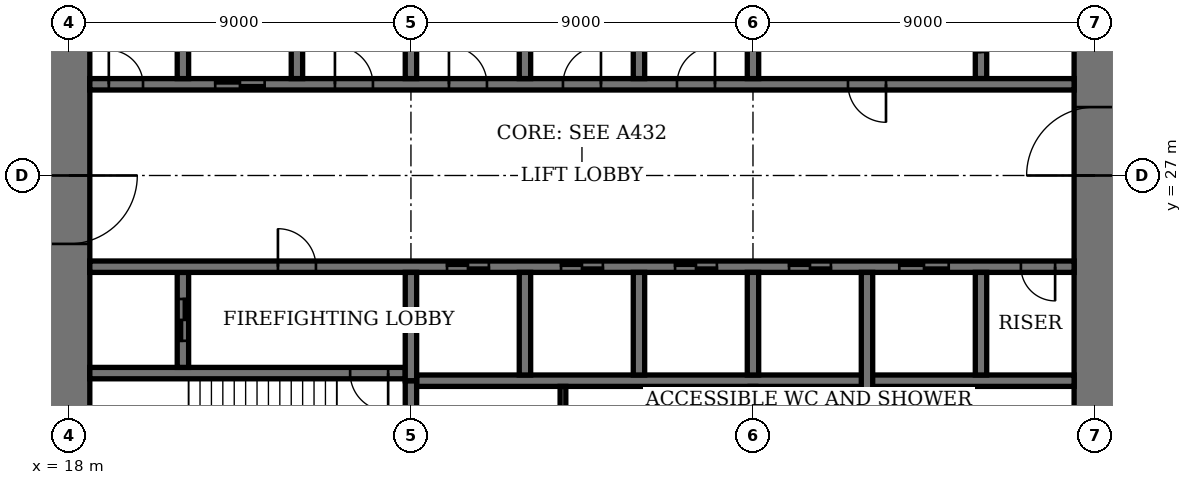
"""IFC4 building model, lengths in metres.
Left out: names, types, materials, properties, quantities, classifications, styles, units other than length and angle.
Written with IfcOpenShell. Run it as: python <this file> out.ifc"""

import sys

from ifc_helpers import new_model, si_unit, direction, frame, frame_2d, origin, place, context, subcontext, project, spatial, rectangle, extrude, element, fill, save


model = new_model("IFC4")
c1 = context("Model", 3, precision=1e-05, world=origin(), true_north=direction((0.0, 1.0)))
c2 = subcontext(c1, "Body", "Model", "MODEL_VIEW")
j1 = project(units=[si_unit("LENGTHUNIT", "METRE"), si_unit("PLANEANGLEUNIT", "RADIAN")], contexts=[c1])
p1 = place(None, origin())
s1 = spatial("IfcSite", under=j1, at=p1, CompositionType="ELEMENT")
p2 = place(p1, origin())
s2 = spatial("IfcBuilding", under=s1, at=p2, CompositionType="ELEMENT")
p3 = place(p2, frame((0.0, 0.0, 263.4)))
s3 = spatial("IfcBuildingStorey", under=s2, at=p3, CompositionType="ELEMENT", Elevation=263.4)
p4 = place(p3, frame((18.0, 35.45, 0.0), z_axis=(0.0, 0.0, 1.0), x_axis=(0.0, -1.0, 0.0)))
e1 = element("IfcWall", 1, at=p4, inside=s3, PredefinedType="SHEAR", context=c2, shape_type="SweptSolid", body=[
    extrude(rectangle(XDim=16.9, YDim=1.1, at=frame_2d((8.45, 0.0))), origin(), (0.0, 0.0, 1.0), 4.0),
])
p5 = place(p4, frame((8.45, 0.0, 0.0)))
e2 = element("IfcOpeningElement", 2, at=p5, cuts=e1, PredefinedType="OPENING", context=c2, shape_type="SweptSolid", body=[
    extrude(rectangle(XDim=1.8, YDim=2.4, at=frame_2d((0.9, 1.2))), frame((0.0, 0.56, 0.0), z_axis=(0.0, -1.0, 0.0), x_axis=(1.0, 0.0, 0.0)), (0.0, 0.0, 1.0), 1.12),
])
p6 = place(p3, frame((45.0, 18.55, 0.0), z_axis=(0.0, 0.0, 1.0), x_axis=(0.0, 1.0, 0.0)))
e3 = element("IfcWall", 3, at=p6, inside=s3, PredefinedType="SHEAR", context=c2, shape_type="SweptSolid", body=[
    extrude(rectangle(XDim=16.9, YDim=1.1, at=frame_2d((8.45, 0.0))), origin(), (0.0, 0.0, 1.0), 4.0),
])
p7 = place(p6, frame((8.45, 0.0, 0.0)))
e4 = element("IfcOpeningElement", 4, at=p7, cuts=e3, PredefinedType="OPENING", context=c2, shape_type="SweptSolid", body=[
    extrude(rectangle(XDim=1.8, YDim=2.4, at=frame_2d((0.9, 1.2))), frame((0.0, 0.56, 0.0), z_axis=(0.0, -1.0, 0.0), x_axis=(1.0, 0.0, 0.0)), (0.0, 0.0, 1.0), 1.12),
])
p8 = place(p3, frame((18.55, 21.8, 0.0), z_axis=(0.0, 0.0, 1.0), x_axis=(1.0, 0.0, 0.0)))
e5 = element("IfcWall", 5, at=p8, inside=s3, PredefinedType="SHEAR", context=c2, shape_type="SweptSolid", body=[
    extrude(rectangle(XDim=8.3, YDim=0.3, at=frame_2d((4.15, 0.0))), origin(), (0.0, 0.0, 1.0), 4.0),
])
p9 = place(p8, frame((6.85, 0.0, 0.0)))
e6 = element("IfcOpeningElement", 6, at=p9, cuts=e5, PredefinedType="OPENING", context=c2, shape_type="SweptSolid", body=[
    extrude(rectangle(XDim=1.0, YDim=2.4, at=frame_2d((0.5, 1.2))), frame((0.0, 0.16, 0.0), z_axis=(0.0, -1.0, 0.0), x_axis=(1.0, 0.0, 0.0)), (0.0, 0.0, 1.0), 0.32),
])
p10 = place(p3, frame((27.0, 18.55, 0.0), z_axis=(0.0, 0.0, 1.0), x_axis=(0.0, 1.0, 0.0)))
e7 = element("IfcWall", 7, at=p10, inside=s3, PredefinedType="SHEAR", context=c2, shape_type="SweptSolid", body=[
    extrude(rectangle(XDim=3.05, YDim=0.3, at=frame_2d((1.525, 0.0))), origin(), (0.0, 0.0, 1.0), 4.0),
])
p11 = place(p3, frame((21.0, 21.95, 0.0), z_axis=(0.0, 0.0, 1.0), x_axis=(0.0, 1.0, 0.0)))
e8 = element("IfcWall", 8, at=p11, inside=s3, PredefinedType="SHEAR", context=c2, shape_type="SweptSolid", body=[
    extrude(rectangle(XDim=2.5, YDim=0.3, at=frame_2d((1.25, 0.0))), origin(), (0.0, 0.0, 1.0), 4.0),
])
p12 = place(p11, frame((0.7, 0.0, 0.0)))
e9 = element("IfcOpeningElement", 9, at=p12, cuts=e8, PredefinedType="OPENING", context=c2, shape_type="SweptSolid", body=[
    extrude(rectangle(XDim=1.1, YDim=2.4, at=frame_2d((0.55, 1.2))), frame((0.0, 0.16, 0.0), z_axis=(0.0, -1.0, 0.0), x_axis=(1.0, 0.0, 0.0)), (0.0, 0.0, 1.0), 0.32),
])
p13 = place(p3, frame((42.0, 29.55, 0.0), z_axis=(0.0, 0.0, 1.0), x_axis=(0.0, 1.0, 0.0)))
e10 = element("IfcWall", 10, at=p13, inside=s3, PredefinedType="SHEAR", context=c2, shape_type="SweptSolid", body=[
    extrude(rectangle(XDim=2.5, YDim=0.3, at=frame_2d((1.25, 0.0))), origin(), (0.0, 0.0, 1.0), 4.0),
])
p14 = place(p13, frame((0.7, 0.0, 0.0)))
e11 = element("IfcOpeningElement", 11, at=p14, cuts=e10, PredefinedType="OPENING", context=c2, shape_type="SweptSolid", body=[
    extrude(rectangle(XDim=1.1, YDim=2.4, at=frame_2d((0.55, 1.2))), frame((0.0, 0.16, 0.0), z_axis=(0.0, -1.0, 0.0), x_axis=(1.0, 0.0, 0.0)), (0.0, 0.0, 1.0), 0.32),
])
p15 = place(p3, frame((18.55, 24.6, 0.0), z_axis=(0.0, 0.0, 1.0), x_axis=(1.0, 0.0, 0.0)))
e12 = element("IfcWall", 12, at=p15, inside=s3, PredefinedType="SHEAR", context=c2, shape_type="SweptSolid", body=[
    extrude(rectangle(XDim=25.9, YDim=0.3, at=frame_2d((12.95, 0.0))), origin(), (0.0, 0.0, 1.0), 4.0),
])
p16 = place(p15, frame((4.95, 0.0, 0.0)))
e13 = element("IfcOpeningElement", 13, at=p16, cuts=e12, PredefinedType="OPENING", context=c2, shape_type="SweptSolid", body=[
    extrude(rectangle(XDim=1.0, YDim=2.4, at=frame_2d((0.5, 1.2))), frame((0.0, 0.16, 0.0), z_axis=(0.0, -1.0, 0.0), x_axis=(1.0, 0.0, 0.0)), (0.0, 0.0, 1.0), 0.32),
])
p17 = place(p15, frame((24.5, 0.0, 0.0)))
e14 = element("IfcOpeningElement", 14, at=p17, cuts=e12, PredefinedType="OPENING", context=c2, shape_type="SweptSolid", body=[
    extrude(rectangle(XDim=0.9, YDim=2.1, at=frame_2d((0.45, 1.05))), frame((0.0, 0.16, 0.0), z_axis=(0.0, -1.0, 0.0), x_axis=(1.0, 0.0, 0.0)), (0.0, 0.0, 1.0), 0.32),
])
p18 = place(p15, frame((9.4, 0.0, 0.0)))
e15 = element("IfcOpeningElement", 15, at=p18, cuts=e12, PredefinedType="OPENING", context=c2, shape_type="SweptSolid", body=[
    extrude(rectangle(XDim=1.1, YDim=2.4, at=frame_2d((0.55, 1.2))), frame((0.0, 0.16, 0.0), z_axis=(0.0, -1.0, 0.0), x_axis=(1.0, 0.0, 0.0)), (0.0, 0.0, 1.0), 0.32),
])
p19 = place(p15, frame((12.4, 0.0, 0.0)))
e16 = element("IfcOpeningElement", 16, at=p19, cuts=e12, PredefinedType="OPENING", context=c2, shape_type="SweptSolid", body=[
    extrude(rectangle(XDim=1.1, YDim=2.4, at=frame_2d((0.55, 1.2))), frame((0.0, 0.16, 0.0), z_axis=(0.0, -1.0, 0.0), x_axis=(1.0, 0.0, 0.0)), (0.0, 0.0, 1.0), 0.32),
])
p20 = place(p15, frame((15.4, 0.0, 0.0)))
e17 = element("IfcOpeningElement", 17, at=p20, cuts=e12, PredefinedType="OPENING", context=c2, shape_type="SweptSolid", body=[
    extrude(rectangle(XDim=1.1, YDim=2.4, at=frame_2d((0.55, 1.2))), frame((0.0, 0.16, 0.0), z_axis=(0.0, -1.0, 0.0), x_axis=(1.0, 0.0, 0.0)), (0.0, 0.0, 1.0), 0.32),
])
p21 = place(p15, frame((18.4, 0.0, 0.0)))
e18 = element("IfcOpeningElement", 18, at=p21, cuts=e12, PredefinedType="OPENING", context=c2, shape_type="SweptSolid", body=[
    extrude(rectangle(XDim=1.1, YDim=2.4, at=frame_2d((0.55, 1.2))), frame((0.0, 0.16, 0.0), z_axis=(0.0, -1.0, 0.0), x_axis=(1.0, 0.0, 0.0)), (0.0, 0.0, 1.0), 0.32),
])
p22 = place(p15, frame((21.3, 0.0, 0.0)))
e19 = element("IfcOpeningElement", 19, at=p22, cuts=e12, PredefinedType="OPENING", context=c2, shape_type="SweptSolid", body=[
    extrude(rectangle(XDim=1.3, YDim=2.4, at=frame_2d((0.65, 1.2))), frame((0.0, 0.16, 0.0), z_axis=(0.0, -1.0, 0.0), x_axis=(1.0, 0.0, 0.0)), (0.0, 0.0, 1.0), 0.32),
])
p23 = place(p3, frame((18.55, 29.4, 0.0), z_axis=(0.0, 0.0, 1.0), x_axis=(1.0, 0.0, 0.0)))
e20 = element("IfcWall", 20, at=p23, inside=s3, PredefinedType="SHEAR", context=c2, shape_type="SweptSolid", body=[
    extrude(rectangle(XDim=25.9, YDim=0.3, at=frame_2d((12.95, 0.0))), origin(), (0.0, 0.0, 1.0), 4.0),
])
p24 = place(p23, frame((19.95, 0.0, 0.0)))
e21 = element("IfcOpeningElement", 21, at=p24, cuts=e20, PredefinedType="OPENING", context=c2, shape_type="SweptSolid", body=[
    extrude(rectangle(XDim=1.0, YDim=2.4, at=frame_2d((0.5, 1.2))), frame((0.0, 0.16, 0.0), z_axis=(0.0, -1.0, 0.0), x_axis=(1.0, 0.0, 0.0)), (0.0, 0.0, 1.0), 0.32),
])
p25 = place(p23, frame((0.5, 0.0, 0.0)))
e22 = element("IfcOpeningElement", 22, at=p25, cuts=e20, PredefinedType="OPENING", context=c2, shape_type="SweptSolid", body=[
    extrude(rectangle(XDim=0.9, YDim=2.1, at=frame_2d((0.45, 1.05))), frame((0.0, 0.16, 0.0), z_axis=(0.0, -1.0, 0.0), x_axis=(1.0, 0.0, 0.0)), (0.0, 0.0, 1.0), 0.32),
])
p26 = place(p23, frame((15.45, 0.0, 0.0)))
e23 = element("IfcOpeningElement", 23, at=p26, cuts=e20, PredefinedType="OPENING", context=c2, shape_type="SweptSolid", body=[
    extrude(rectangle(XDim=1.0, YDim=2.4, at=frame_2d((0.5, 1.2))), frame((0.0, 0.16, 0.0), z_axis=(0.0, -1.0, 0.0), x_axis=(1.0, 0.0, 0.0)), (0.0, 0.0, 1.0), 0.32),
])
p27 = place(p23, frame((12.45, 0.0, 0.0)))
e24 = element("IfcOpeningElement", 24, at=p27, cuts=e20, PredefinedType="OPENING", context=c2, shape_type="SweptSolid", body=[
    extrude(rectangle(XDim=1.0, YDim=2.4, at=frame_2d((0.5, 1.2))), frame((0.0, 0.16, 0.0), z_axis=(0.0, -1.0, 0.0), x_axis=(1.0, 0.0, 0.0)), (0.0, 0.0, 1.0), 0.32),
])
p28 = place(p23, frame((9.45, 0.0, 0.0)))
e25 = element("IfcOpeningElement", 25, at=p28, cuts=e20, PredefinedType="OPENING", context=c2, shape_type="SweptSolid", body=[
    extrude(rectangle(XDim=1.0, YDim=2.4, at=frame_2d((0.5, 1.2))), frame((0.0, 0.16, 0.0), z_axis=(0.0, -1.0, 0.0), x_axis=(1.0, 0.0, 0.0)), (0.0, 0.0, 1.0), 0.32),
])
p29 = place(p23, frame((6.45, 0.0, 0.0)))
e26 = element("IfcOpeningElement", 26, at=p29, cuts=e20, PredefinedType="OPENING", context=c2, shape_type="SweptSolid", body=[
    extrude(rectangle(XDim=1.0, YDim=2.4, at=frame_2d((0.5, 1.2))), frame((0.0, 0.16, 0.0), z_axis=(0.0, -1.0, 0.0), x_axis=(1.0, 0.0, 0.0)), (0.0, 0.0, 1.0), 0.32),
])
p30 = place(p23, frame((3.3, 0.0, 0.0)))
e27 = element("IfcOpeningElement", 27, at=p30, cuts=e20, PredefinedType="OPENING", context=c2, shape_type="SweptSolid", body=[
    extrude(rectangle(XDim=1.3, YDim=2.4, at=frame_2d((0.65, 1.2))), frame((0.0, 0.16, 0.0), z_axis=(0.0, -1.0, 0.0), x_axis=(1.0, 0.0, 0.0)), (0.0, 0.0, 1.0), 0.32),
])
p31 = place(p3, frame((27.15, 21.6, 0.0), z_axis=(0.0, 0.0, 1.0), x_axis=(1.0, 0.0, 0.0)))
e28 = element("IfcWall", 28, at=p31, inside=s3, PredefinedType="SHEAR", context=c2, shape_type="SweptSolid", body=[
    extrude(rectangle(XDim=17.3, YDim=0.3, at=frame_2d((8.65, 0.0))), origin(), (0.0, 0.0, 1.0), 4.0),
])
for number, where, z_axis, x_axis in (
    (29, (30.0, 21.75, 0.0), (0.0, 0.0, 1.0), (0.0, 1.0, 0.0)),
    (30, (33.0, 29.55, 0.0), (0.0, 0.0, 1.0), (0.0, 1.0, 0.0)),
    (31, (33.0, 21.75, 0.0), (0.0, 0.0, 1.0), (0.0, 1.0, 0.0)),
    (32, (30.0, 29.55, 0.0), (0.0, 0.0, 1.0), (0.0, 1.0, 0.0)),
    (33, (36.0, 21.75, 0.0), (0.0, 0.0, 1.0), (0.0, 1.0, 0.0)),
    (34, (27.0, 29.55, 0.0), (0.0, 0.0, 1.0), (0.0, 1.0, 0.0)),
):
    element("IfcWall", number, at=place(p3, frame(where, z_axis=z_axis, x_axis=x_axis)), inside=s3, PredefinedType="SHEAR", context=c2, shape_type="SweptSolid", body=[
        extrude(rectangle(XDim=2.7, YDim=0.3, at=frame_2d((1.35, 0.0))), origin(), (0.0, 0.0, 1.0), 4.0),
    ])
for number, where, z_axis, x_axis in (
    (35, (39.0, 18.55, 0.0), (0.0, 0.0, 1.0), (0.0, 1.0, 0.0)),
    (36, (24.0, 29.55, 0.0), (0.0, 0.0, 1.0), (0.0, 1.0, 0.0)),
):
    element("IfcWall", number, at=place(p3, frame(where, z_axis=z_axis, x_axis=x_axis)), inside=s3, PredefinedType="SHEAR", context=c2, shape_type="SweptSolid", body=[
        extrude(rectangle(XDim=5.9, YDim=0.3, at=frame_2d((2.95, 0.0))), origin(), (0.0, 0.0, 1.0), 4.0),
    ])
for number, where, z_axis, x_axis in (
    (37, (42.0, 21.75, 0.0), (0.0, 0.0, 1.0), (0.0, 1.0, 0.0)),
    (38, (21.0, 29.55, 0.0), (0.0, 0.0, 1.0), (0.0, 1.0, 0.0)),
):
    element("IfcWall", number, at=place(p3, frame(where, z_axis=z_axis, x_axis=x_axis)), inside=s3, PredefinedType="SHEAR", context=c2, shape_type="SweptSolid", body=[
        extrude(rectangle(XDim=2.7, YDim=0.3, at=frame_2d((1.35, 0.0))), origin(), (0.0, 0.0, 1.0), 4.0),
    ])
for number, where, z_axis, x_axis in (
    (39, (27.0, 21.6, 0.0), (0.0, 0.0, 1.0), (0.0, 1.0, 0.0)),
    (40, (36.0, 29.55, 0.0), (0.0, 0.0, 1.0), (0.0, 1.0, 0.0)),
):
    element("IfcWall", number, at=place(p3, frame(where, z_axis=z_axis, x_axis=x_axis)), inside=s3, PredefinedType="SHEAR", context=c2, shape_type="SweptSolid", body=[
        extrude(rectangle(XDim=2.85, YDim=0.3, at=frame_2d((1.425, 0.0))), origin(), (0.0, 0.0, 1.0), 4.0),
    ])
for number, where, z_axis, x_axis in (
    (41, (31.0, 18.55, 0.0), (0.0, 0.0, 1.0), (0.0, 1.0, 0.0)),
    (42, (36.0, 18.55, 0.0), (0.0, 0.0, 1.0), (0.0, 1.0, 0.0)),
):
    element("IfcWall", number, at=place(p3, frame(where, z_axis=z_axis, x_axis=x_axis)), inside=s3, PredefinedType="PARTITIONING", context=c2, shape_type="SweptSolid", body=[
        extrude(rectangle(XDim=2.9, YDim=0.15, at=frame_2d((1.45, 0.0))), origin(), (0.0, 0.0, 1.0), 3.75),
    ])
p32 = place(p5, origin())
e43 = element("IfcDoor", 43, at=p32, inside=s3, OperationType="DOUBLE_DOOR_DOUBLE_SWING", PredefinedType="DOOR", context=c2, shape_type="SweptSolid", body=[
    extrude(rectangle(XDim=1.8, YDim=2.4, at=frame_2d((0.9, 1.2))), frame((0.0, 0.03, 0.0), z_axis=(0.0, -1.0, 0.0), x_axis=(1.0, 0.0, 0.0)), (0.0, 0.0, 1.0), 0.06),
    extrude(rectangle(XDim=0.04, YDim=2.4, at=frame_2d((0.02, 1.2))), frame((0.0, 0.55, 0.0), z_axis=(0.0, -1.0, 0.0), x_axis=(1.0, 0.0, 0.0)), (0.0, 0.0, 1.0), 1.1),
    extrude(rectangle(XDim=0.04, YDim=2.4, at=frame_2d((1.78, 1.2))), frame((0.0, 0.55, 0.0), z_axis=(0.0, -1.0, 0.0), x_axis=(1.0, 0.0, 0.0)), (0.0, 0.0, 1.0), 1.1),
    extrude(rectangle(XDim=1.8, YDim=0.04, at=frame_2d((0.9, 2.38))), frame((0.0, 0.55, 0.0), z_axis=(0.0, -1.0, 0.0), x_axis=(1.0, 0.0, 0.0)), (0.0, 0.0, 1.0), 1.1),
])
fill(e2, e43)
p33 = place(p7, origin())
e44 = element("IfcDoor", 44, at=p33, inside=s3, OperationType="DOUBLE_DOOR_DOUBLE_SWING", PredefinedType="DOOR", context=c2, shape_type="SweptSolid", body=[
    extrude(rectangle(XDim=1.8, YDim=2.4, at=frame_2d((0.9, 1.2))), frame((0.0, 0.03, 0.0), z_axis=(0.0, -1.0, 0.0), x_axis=(1.0, 0.0, 0.0)), (0.0, 0.0, 1.0), 0.06),
    extrude(rectangle(XDim=0.04, YDim=2.4, at=frame_2d((0.02, 1.2))), frame((0.0, 0.55, 0.0), z_axis=(0.0, -1.0, 0.0), x_axis=(1.0, 0.0, 0.0)), (0.0, 0.0, 1.0), 1.1),
    extrude(rectangle(XDim=0.04, YDim=2.4, at=frame_2d((1.78, 1.2))), frame((0.0, 0.55, 0.0), z_axis=(0.0, -1.0, 0.0), x_axis=(1.0, 0.0, 0.0)), (0.0, 0.0, 1.0), 1.1),
    extrude(rectangle(XDim=1.8, YDim=0.04, at=frame_2d((0.9, 2.38))), frame((0.0, 0.55, 0.0), z_axis=(0.0, -1.0, 0.0), x_axis=(1.0, 0.0, 0.0)), (0.0, 0.0, 1.0), 1.1),
])
fill(e4, e44)
p34 = place(p9, origin())
e45 = element("IfcDoor", 45, at=p34, inside=s3, OperationType="SINGLE_SWING_RIGHT", PredefinedType="DOOR", context=c2, shape_type="SweptSolid", body=[
    extrude(rectangle(XDim=1.0, YDim=2.4, at=frame_2d((0.5, 1.2))), frame((0.0, 0.03, 0.0), z_axis=(0.0, -1.0, 0.0), x_axis=(1.0, 0.0, 0.0)), (0.0, 0.0, 1.0), 0.06),
])
fill(e6, e45)
p35 = place(p16, origin())
e46 = element("IfcDoor", 46, at=p35, inside=s3, OperationType="SINGLE_SWING_RIGHT", PredefinedType="DOOR", context=c2, shape_type="SweptSolid", body=[
    extrude(rectangle(XDim=1.0, YDim=2.4, at=frame_2d((0.5, 1.2))), frame((0.0, 0.03, 0.0), z_axis=(0.0, -1.0, 0.0), x_axis=(1.0, 0.0, 0.0)), (0.0, 0.0, 1.0), 0.06),
])
fill(e13, e46)
p36 = place(p24, origin())
e47 = element("IfcDoor", 47, at=p36, inside=s3, OperationType="SINGLE_SWING_RIGHT", PredefinedType="DOOR", context=c2, shape_type="SweptSolid", body=[
    extrude(rectangle(XDim=1.0, YDim=2.4, at=frame_2d((0.5, 1.2))), frame((0.0, 0.03, 0.0), z_axis=(0.0, -1.0, 0.0), x_axis=(1.0, 0.0, 0.0)), (0.0, 0.0, 1.0), 0.06),
])
fill(e21, e47)
p37 = place(p17, origin())
e48 = element("IfcDoor", 48, at=p37, inside=s3, OperationType="SINGLE_SWING_RIGHT", PredefinedType="DOOR", context=c2, shape_type="SweptSolid", body=[
    extrude(rectangle(XDim=0.9, YDim=2.1, at=frame_2d((0.45, 1.05))), frame((0.0, 0.03, 0.0), z_axis=(0.0, -1.0, 0.0), x_axis=(1.0, 0.0, 0.0)), (0.0, 0.0, 1.0), 0.06),
])
fill(e14, e48)
p38 = place(p25, origin())
e49 = element("IfcDoor", 49, at=p38, inside=s3, OperationType="SINGLE_SWING_RIGHT", PredefinedType="DOOR", context=c2, shape_type="SweptSolid", body=[
    extrude(rectangle(XDim=0.9, YDim=2.1, at=frame_2d((0.45, 1.05))), frame((0.0, 0.03, 0.0), z_axis=(0.0, -1.0, 0.0), x_axis=(1.0, 0.0, 0.0)), (0.0, 0.0, 1.0), 0.06),
])
fill(e22, e49)
p39 = place(p18, origin())
e50 = element("IfcDoor", 50, at=p39, inside=s3, OperationType="DOUBLE_DOOR_SLIDING", PredefinedType="DOOR", context=c2, shape_type="SweptSolid", body=[
    extrude(rectangle(XDim=1.1, YDim=2.4, at=frame_2d((0.55, 1.2))), frame((0.0, 0.02, 0.0), z_axis=(0.0, -1.0, 0.0), x_axis=(1.0, 0.0, 0.0)), (0.0, 0.0, 1.0), 0.04),
])
fill(e15, e50)
p40 = place(p19, origin())
e51 = element("IfcDoor", 51, at=p40, inside=s3, OperationType="DOUBLE_DOOR_SLIDING", PredefinedType="DOOR", context=c2, shape_type="SweptSolid", body=[
    extrude(rectangle(XDim=1.1, YDim=2.4, at=frame_2d((0.55, 1.2))), frame((0.0, 0.02, 0.0), z_axis=(0.0, -1.0, 0.0), x_axis=(1.0, 0.0, 0.0)), (0.0, 0.0, 1.0), 0.04),
])
fill(e16, e51)
p41 = place(p20, origin())
e52 = element("IfcDoor", 52, at=p41, inside=s3, OperationType="DOUBLE_DOOR_SLIDING", PredefinedType="DOOR", context=c2, shape_type="SweptSolid", body=[
    extrude(rectangle(XDim=1.1, YDim=2.4, at=frame_2d((0.55, 1.2))), frame((0.0, 0.02, 0.0), z_axis=(0.0, -1.0, 0.0), x_axis=(1.0, 0.0, 0.0)), (0.0, 0.0, 1.0), 0.04),
])
fill(e17, e52)
p42 = place(p21, origin())
e53 = element("IfcDoor", 53, at=p42, inside=s3, OperationType="DOUBLE_DOOR_SLIDING", PredefinedType="DOOR", context=c2, shape_type="SweptSolid", body=[
    extrude(rectangle(XDim=1.1, YDim=2.4, at=frame_2d((0.55, 1.2))), frame((0.0, 0.02, 0.0), z_axis=(0.0, -1.0, 0.0), x_axis=(1.0, 0.0, 0.0)), (0.0, 0.0, 1.0), 0.04),
])
fill(e18, e53)
p43 = place(p26, origin())
e54 = element("IfcDoor", 54, at=p43, inside=s3, OperationType="SINGLE_SWING_LEFT", PredefinedType="DOOR", context=c2, shape_type="SweptSolid", body=[
    extrude(rectangle(XDim=1.0, YDim=2.4, at=frame_2d((0.5, 1.2))), frame((0.0, 0.03, 0.0), z_axis=(0.0, -1.0, 0.0), x_axis=(1.0, 0.0, 0.0)), (0.0, 0.0, 1.0), 0.06),
])
fill(e23, e54)
p44 = place(p27, origin())
e55 = element("IfcDoor", 55, at=p44, inside=s3, OperationType="SINGLE_SWING_LEFT", PredefinedType="DOOR", context=c2, shape_type="SweptSolid", body=[
    extrude(rectangle(XDim=1.0, YDim=2.4, at=frame_2d((0.5, 1.2))), frame((0.0, 0.03, 0.0), z_axis=(0.0, -1.0, 0.0), x_axis=(1.0, 0.0, 0.0)), (0.0, 0.0, 1.0), 0.06),
])
fill(e24, e55)
p45 = place(p28, origin())
e56 = element("IfcDoor", 56, at=p45, inside=s3, OperationType="SINGLE_SWING_RIGHT", PredefinedType="DOOR", context=c2, shape_type="SweptSolid", body=[
    extrude(rectangle(XDim=1.0, YDim=2.4, at=frame_2d((0.5, 1.2))), frame((0.0, 0.03, 0.0), z_axis=(0.0, -1.0, 0.0), x_axis=(1.0, 0.0, 0.0)), (0.0, 0.0, 1.0), 0.06),
])
fill(e25, e56)
p46 = place(p29, origin())
e57 = element("IfcDoor", 57, at=p46, inside=s3, OperationType="SINGLE_SWING_RIGHT", PredefinedType="DOOR", context=c2, shape_type="SweptSolid", body=[
    extrude(rectangle(XDim=1.0, YDim=2.4, at=frame_2d((0.5, 1.2))), frame((0.0, 0.03, 0.0), z_axis=(0.0, -1.0, 0.0), x_axis=(1.0, 0.0, 0.0)), (0.0, 0.0, 1.0), 0.06),
])
fill(e26, e57)
p47 = place(p22, origin())
e58 = element("IfcDoor", 58, at=p47, inside=s3, OperationType="DOUBLE_DOOR_SLIDING", PredefinedType="DOOR", context=c2, shape_type="SweptSolid", body=[
    extrude(rectangle(XDim=1.3, YDim=2.4, at=frame_2d((0.65, 1.2))), frame((0.0, 0.02, 0.0), z_axis=(0.0, -1.0, 0.0), x_axis=(1.0, 0.0, 0.0)), (0.0, 0.0, 1.0), 0.04),
])
fill(e19, e58)
p48 = place(p30, origin())
e59 = element("IfcDoor", 59, at=p48, inside=s3, OperationType="DOUBLE_DOOR_SLIDING", PredefinedType="DOOR", context=c2, shape_type="SweptSolid", body=[
    extrude(rectangle(XDim=1.3, YDim=2.4, at=frame_2d((0.65, 1.2))), frame((0.0, 0.02, 0.0), z_axis=(0.0, -1.0, 0.0), x_axis=(1.0, 0.0, 0.0)), (0.0, 0.0, 1.0), 0.04),
])
fill(e27, e59)
p49 = place(p12, origin())
e60 = element("IfcDoor", 60, at=p49, inside=s3, OperationType="DOUBLE_DOOR_SLIDING", PredefinedType="DOOR", context=c2, shape_type="SweptSolid", body=[
    extrude(rectangle(XDim=1.1, YDim=2.4, at=frame_2d((0.55, 1.2))), frame((0.0, 0.03, 0.0), z_axis=(0.0, -1.0, 0.0), x_axis=(1.0, 0.0, 0.0)), (0.0, 0.0, 1.0), 0.06),
])
fill(e9, e60)
save(model, sys.argv[1])
